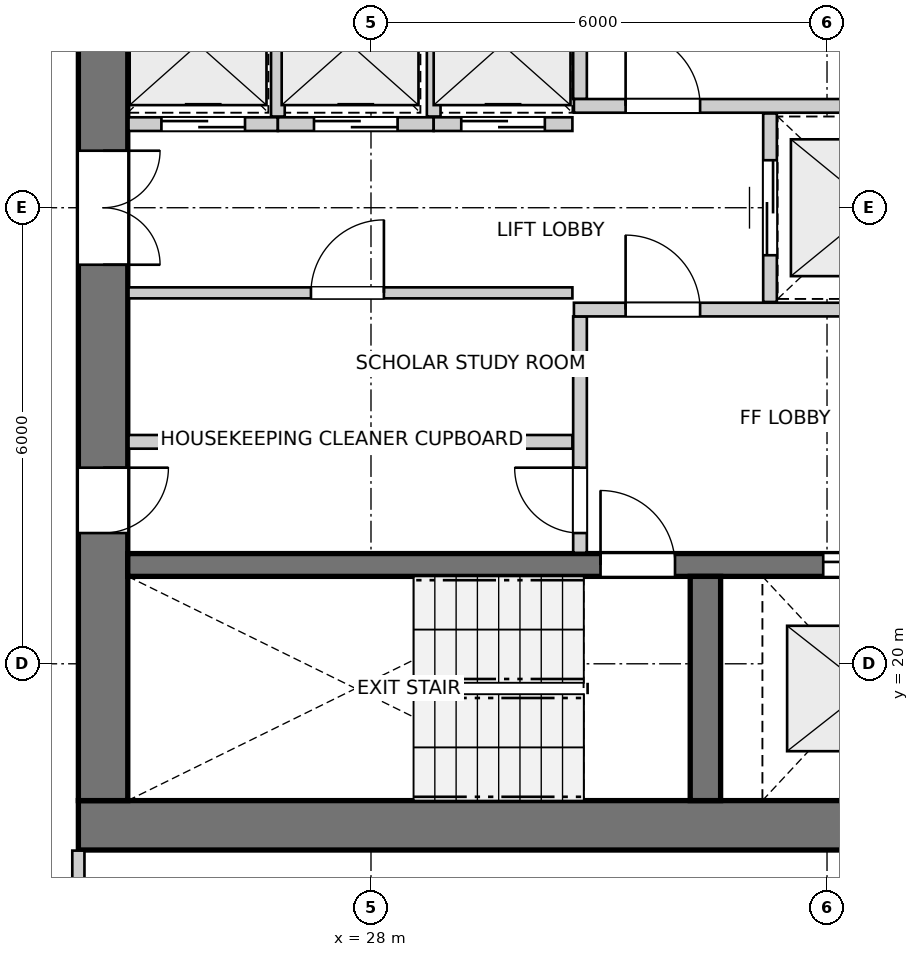
"""IFC4 building model, lengths in metres.
Left out: names, types, materials, properties, quantities, classifications, styles, units other than length and angle.
Written with IfcOpenShell. Run it as: python <this file> out.ifc"""

import sys

from ifc_helpers import new_model, si_unit, direction, frame, frame_2d, origin, place, context, subcontext, project, spatial, rectangle, extrude, source, transform, mapped, element, fill, save


model = new_model("IFC4")
c1 = context("Model", 3, precision=1e-05, world=origin(), true_north=direction((0.0, 1.0)))
c2 = subcontext(c1, "Body", "Model", "MODEL_VIEW")
j1 = project(units=[si_unit("LENGTHUNIT", "METRE"), si_unit("PLANEANGLEUNIT", "RADIAN")], contexts=[c1])
p1 = place(None, origin())
s1 = spatial("IfcSite", under=j1, at=p1, CompositionType="ELEMENT")
p2 = place(p1, origin())
s2 = spatial("IfcBuilding", under=s1, at=p2, CompositionType="ELEMENT")
p3 = place(p2, frame((0.0, 0.0, 139.4)))
s3 = spatial("IfcBuildingStorey", under=s2, at=p3, CompositionType="ELEMENT", Elevation=139.4)
p4 = place(p3, frame((24.15, 17.875, 0.0), z_axis=(0.0, 0.0, 1.0), x_axis=(1.0, 0.0, 0.0)))
e1 = element("IfcWall", 1, at=p4, inside=s3, PredefinedType="SHEAR", context=c2, shape_type="SweptSolid", body=[
    extrude(rectangle(XDim=12.4, YDim=0.65, at=frame_2d((6.2, 0.0))), origin(), (0.0, 0.0, 1.0), 2.95),
])
p5 = place(p3, frame((24.475, 33.8, 0.0), z_axis=(0.0, 0.0, 1.0), x_axis=(0.0, -1.0, 0.0)))
e2 = element("IfcWall", 2, at=p5, inside=s3, PredefinedType="SHEAR", context=c2, shape_type="SweptSolid", body=[
    extrude(rectangle(XDim=15.6, YDim=0.65, at=frame_2d((7.8, 0.0))), origin(), (0.0, 0.0, 1.0), 2.95),
])
p6 = place(p5, frame((7.05, 0.0, 0.0)))
e3 = element("IfcOpeningElement", 3, at=p6, cuts=e2, PredefinedType="OPENING", context=c2, shape_type="SweptSolid", body=[
    extrude(rectangle(XDim=1.5, YDim=2.15, at=frame_2d((0.75, 1.075))), frame((0.0, 0.335, 0.0), z_axis=(0.0, -1.0, 0.0), x_axis=(1.0, 0.0, 0.0)), (0.0, 0.0, 1.0), 0.67),
])
p7 = place(p5, frame((3.52, 0.0, 0.0)))
e4 = element("IfcOpeningElement", 4, at=p7, cuts=e2, PredefinedType="OPENING", context=c2, shape_type="SweptSolid", body=[
    extrude(rectangle(XDim=0.86, YDim=2.05, at=frame_2d((0.43, 1.025))), frame((0.0, 0.335, 0.0), z_axis=(0.0, -1.0, 0.0), x_axis=(1.0, 0.0, 0.0)), (0.0, 0.0, 1.0), 0.67),
])
p8 = place(p5, frame((11.22, 0.0, 0.0)))
e5 = element("IfcOpeningElement", 5, at=p8, cuts=e2, PredefinedType="OPENING", context=c2, shape_type="SweptSolid", body=[
    extrude(rectangle(XDim=0.86, YDim=2.05, at=frame_2d((0.43, 1.025))), frame((0.0, 0.335, 0.0), z_axis=(0.0, -1.0, 0.0), x_axis=(1.0, 0.0, 0.0)), (0.0, 0.0, 1.0), 0.67),
])
p9 = place(p3, frame((24.8, 21.3, 0.0), z_axis=(0.0, 0.0, 1.0), x_axis=(1.0, 0.0, 0.0)))
e6 = element("IfcWall", 6, at=p9, inside=s3, PredefinedType="SHEAR", context=c2, shape_type="SweptSolid", body=[
    extrude(rectangle(XDim=11.1, YDim=0.3, at=frame_2d((5.55, 0.0))), origin(), (0.0, 0.0, 1.0), 2.95),
])
p10 = place(p9, frame((6.22, 0.0, 0.0)))
e7 = element("IfcOpeningElement", 7, at=p10, cuts=e6, PredefinedType="OPENING", context=c2, shape_type="SweptSolid", body=[
    extrude(rectangle(XDim=0.98, YDim=2.15, at=frame_2d((0.49, 1.075))), frame((0.0, 0.16, 0.0), z_axis=(0.0, -1.0, 0.0), x_axis=(1.0, 0.0, 0.0)), (0.0, 0.0, 1.0), 0.32),
])
p11 = place(p9, frame((9.15, 0.0, 0.0)))
e8 = element("IfcOpeningElement", 8, at=p11, cuts=e6, PredefinedType="OPENING", context=c2, shape_type="SweptSolid", body=[
    extrude(rectangle(XDim=1.15, YDim=2.15, at=frame_2d((0.575, 1.075))), frame((0.0, 0.16, 0.0), z_axis=(0.0, -1.0, 0.0), x_axis=(1.0, 0.0, 0.0)), (0.0, 0.0, 1.0), 0.32),
])
p12 = place(p3, frame((32.4, 18.2, 0.0), z_axis=(0.0, 0.0, 1.0), x_axis=(0.0, 1.0, 0.0)))
e9 = element("IfcWall", 9, at=p12, inside=s3, PredefinedType="SHEAR", context=c2, shape_type="SweptSolid", body=[
    extrude(rectangle(XDim=2.95, YDim=0.4, at=frame_2d((1.475, 0.0))), origin(), (0.0, 0.0, 1.0), 2.95),
])
p13 = place(p3, frame((30.75, 21.46, 0.0), z_axis=(0.0, 0.0, 1.0), x_axis=(0.0, 1.0, 0.0)))
e10 = element("IfcWall", 10, at=p13, inside=s3, PredefinedType="PARTITIONING", context=c2, shape_type="SweptSolid", body=[
    extrude(rectangle(XDim=3.11, YDim=0.18, at=frame_2d((1.555, 0.0))), origin(), (0.0, 0.0, 1.0), 2.95),
])
p14 = place(p13, frame((0.26, 0.0, 0.0)))
e11 = element("IfcOpeningElement", 11, at=p14, cuts=e10, PredefinedType="OPENING", context=c2, shape_type="SweptSolid", body=[
    extrude(rectangle(XDim=0.86, YDim=2.05, at=frame_2d((0.43, 1.025))), frame((0.0, 0.1, 0.0), z_axis=(0.0, -1.0, 0.0), x_axis=(1.0, 0.0, 0.0)), (0.0, 0.0, 1.0), 0.2),
])
p15 = place(p3, frame((30.67, 24.66, 0.0), z_axis=(0.0, 0.0, 1.0), x_axis=(1.0, 0.0, 0.0)))
e12 = element("IfcWall", 12, at=p15, inside=s3, PredefinedType="PARTITIONING", context=c2, shape_type="SweptSolid", body=[
    extrude(rectangle(XDim=5.22, YDim=0.18, at=frame_2d((2.61, 0.0))), origin(), (0.0, 0.0, 1.0), 2.95),
])
p16 = place(p15, frame((0.68, 0.0, 0.0)))
e13 = element("IfcOpeningElement", 13, at=p16, cuts=e12, PredefinedType="OPENING", context=c2, shape_type="SweptSolid", body=[
    extrude(rectangle(XDim=0.98, YDim=2.15, at=frame_2d((0.49, 1.075))), frame((0.0, 0.1, 0.0), z_axis=(0.0, -1.0, 0.0), x_axis=(1.0, 0.0, 0.0)), (0.0, 0.0, 1.0), 0.2),
])
p17 = place(p3, frame((30.75, 27.43, 0.0), z_axis=(0.0, 0.0, 1.0), x_axis=(0.0, 1.0, 0.0)))
e14 = element("IfcWall", 14, at=p17, inside=s3, PredefinedType="PARTITIONING", context=c2, shape_type="SweptSolid", body=[
    extrude(rectangle(XDim=3.11, YDim=0.18, at=frame_2d((1.555, 0.0))), origin(), (0.0, 0.0, 1.0), 2.95),
])
p18 = place(p17, frame((1.98, 0.0, 0.0)))
e15 = element("IfcOpeningElement", 15, at=p18, cuts=e14, PredefinedType="OPENING", context=c2, shape_type="SweptSolid", body=[
    extrude(rectangle(XDim=0.86, YDim=2.05, at=frame_2d((0.43, 1.025))), frame((0.0, 0.1, 0.0), z_axis=(0.0, -1.0, 0.0), x_axis=(1.0, 0.0, 0.0)), (0.0, 0.0, 1.0), 0.2),
])
p19 = place(p3, frame((30.67, 27.34, 0.0), z_axis=(0.0, 0.0, 1.0), x_axis=(1.0, 0.0, 0.0)))
e16 = element("IfcWall", 16, at=p19, inside=s3, PredefinedType="PARTITIONING", context=c2, shape_type="SweptSolid", body=[
    extrude(rectangle(XDim=5.22, YDim=0.18, at=frame_2d((2.61, 0.0))), origin(), (0.0, 0.0, 1.0), 2.95),
])
p20 = place(p19, frame((0.68, 0.0, 0.0)))
e17 = element("IfcOpeningElement", 17, at=p20, cuts=e16, PredefinedType="OPENING", context=c2, shape_type="SweptSolid", body=[
    extrude(rectangle(XDim=0.98, YDim=2.15, at=frame_2d((0.49, 1.075))), frame((0.0, 0.1, 0.0), z_axis=(0.0, -1.0, 0.0), x_axis=(1.0, 0.0, 0.0)), (0.0, 0.0, 1.0), 0.2),
])
p21 = place(p3, frame((33.25, 24.76, 0.0), z_axis=(0.0, 0.0, 1.0), x_axis=(0.0, 1.0, 0.0)))
e18 = element("IfcWall", 18, at=p21, inside=s3, PredefinedType="PARTITIONING", context=c2, shape_type="SweptSolid", body=[
    extrude(rectangle(XDim=2.48, YDim=0.18, at=frame_2d((1.24, 0.0))), origin(), (0.0, 0.0, 1.0), 2.95),
])
p22 = place(p21, frame((0.615, 0.0, 0.0)))
e19 = element("IfcOpeningElement", 19, at=p22, cuts=e18, PredefinedType="OPENING", context=c2, shape_type="SweptSolid", body=[
    extrude(rectangle(XDim=1.25, YDim=2.15, at=frame_2d((0.625, 1.075))), frame((0.0, 0.1, 0.0), z_axis=(0.0, -1.0, 0.0), x_axis=(1.0, 0.0, 0.0)), (0.0, 0.0, 1.0), 0.2),
])
p23 = place(p3, frame((24.81, 22.92, 0.0), z_axis=(0.0, 0.0, 1.0), x_axis=(1.0, 0.0, 0.0)))
e20 = element("IfcWall", 20, at=p23, inside=s3, PredefinedType="PARTITIONING", context=c2, shape_type="SweptSolid", body=[
    extrude(rectangle(XDim=5.84, YDim=0.18, at=frame_2d((2.92, 0.0))), origin(), (0.0, 0.0, 1.0), 2.95),
])
p24 = place(p3, frame((24.81, 24.88, 0.0), z_axis=(0.0, 0.0, 1.0), x_axis=(1.0, 0.0, 0.0)))
e21 = element("IfcWall", 21, at=p24, inside=s3, PredefinedType="PARTITIONING", context=c2, shape_type="SweptSolid", body=[
    extrude(rectangle(XDim=5.84, YDim=0.145, at=frame_2d((2.92, 0.0))), origin(), (0.0, 0.0, 1.0), 2.95),
])
p25 = place(p24, frame((2.4, 0.0, 0.0)))
e22 = element("IfcOpeningElement", 22, at=p25, cuts=e21, PredefinedType="OPENING", context=c2, shape_type="SweptSolid", body=[
    extrude(rectangle(XDim=0.96, YDim=2.1, at=frame_2d((0.48, 1.05))), frame((0.0, 0.083, 0.0), z_axis=(0.0, -1.0, 0.0), x_axis=(1.0, 0.0, 0.0)), (0.0, 0.0, 1.0), 0.165),
])
p26 = place(p3, frame((24.81, 27.1, 0.0), z_axis=(0.0, 0.0, 1.0), x_axis=(1.0, 0.0, 0.0)))
e23 = element("IfcWall", 23, at=p26, inside=s3, PredefinedType="PARTITIONING", context=c2, shape_type="SweptSolid", body=[
    extrude(rectangle(XDim=1.965, YDim=0.18, at=frame_2d((0.982, 0.0))), origin(), (0.0, 0.0, 1.0), 2.95),
])
p27 = place(p26, frame((0.433, 0.0, 0.0)))
e24 = element("IfcOpeningElement", 24, at=p27, cuts=e23, PredefinedType="OPENING", context=c2, shape_type="SweptSolid", body=[
    extrude(rectangle(XDim=1.1, YDim=2.15, at=frame_2d((0.55, 1.075))), frame((0.0, 0.1, 0.0), z_axis=(0.0, -1.0, 0.0), x_axis=(1.0, 0.0, 0.0)), (0.0, 0.0, 1.0), 0.2),
])
p28 = place(p3, frame((26.775, 27.1, 0.0), z_axis=(0.0, 0.0, 1.0), x_axis=(1.0, 0.0, 0.0)))
e25 = element("IfcWall", 25, at=p28, inside=s3, PredefinedType="PARTITIONING", context=c2, shape_type="SweptSolid", body=[
    extrude(rectangle(XDim=2.05, YDim=0.18, at=frame_2d((1.025, 0.0))), origin(), (0.0, 0.0, 1.0), 2.95),
])
p29 = place(p28, frame((0.475, 0.0, 0.0)))
e26 = element("IfcOpeningElement", 26, at=p29, cuts=e25, PredefinedType="OPENING", context=c2, shape_type="SweptSolid", body=[
    extrude(rectangle(XDim=1.1, YDim=2.15, at=frame_2d((0.55, 1.075))), frame((0.0, 0.1, 0.0), z_axis=(0.0, -1.0, 0.0), x_axis=(1.0, 0.0, 0.0)), (0.0, 0.0, 1.0), 0.2),
])
p30 = place(p3, frame((26.775, 27.2, 0.0), z_axis=(0.0, 0.0, 1.0), x_axis=(0.0, 1.0, 0.0)))
e27 = element("IfcWall", 27, at=p30, inside=s3, PredefinedType="PARTITIONING", context=c2, shape_type="SweptSolid", body=[
    extrude(rectangle(XDim=1.78, YDim=0.18, at=frame_2d((0.89, 0.0))), origin(), (0.0, 0.0, 1.0), 2.95),
])
p31 = place(p3, frame((28.825, 27.1, 0.0), z_axis=(0.0, 0.0, 1.0), x_axis=(1.0, 0.0, 0.0)))
e28 = element("IfcWall", 28, at=p31, inside=s3, PredefinedType="PARTITIONING", context=c2, shape_type="SweptSolid", body=[
    extrude(rectangle(XDim=1.825, YDim=0.18, at=frame_2d((0.913, 0.0))), origin(), (0.0, 0.0, 1.0), 2.95),
])
p32 = place(p31, frame((0.363, 0.0, 0.0)))
e29 = element("IfcOpeningElement", 29, at=p32, cuts=e28, PredefinedType="OPENING", context=c2, shape_type="SweptSolid", body=[
    extrude(rectangle(XDim=1.1, YDim=2.15, at=frame_2d((0.55, 1.075))), frame((0.0, 0.1, 0.0), z_axis=(0.0, -1.0, 0.0), x_axis=(1.0, 0.0, 0.0)), (0.0, 0.0, 1.0), 0.2),
])
p33 = place(p3, frame((28.825, 27.2, 0.0), z_axis=(0.0, 0.0, 1.0), x_axis=(0.0, 1.0, 0.0)))
e30 = element("IfcWall", 30, at=p33, inside=s3, PredefinedType="PARTITIONING", context=c2, shape_type="SweptSolid", body=[
    extrude(rectangle(XDim=1.78, YDim=0.18, at=frame_2d((0.89, 0.0))), origin(), (0.0, 0.0, 1.0), 2.95),
])
p34 = place(p3, frame((24.15, 13.516, 0.0), z_axis=(0.0, 0.0, 1.0), x_axis=(0.0, 1.0, 0.0)))
e31 = element("IfcWall", 31, at=p34, inside=s3, PredefinedType="PARTITIONING", context=c2, shape_type="SweptSolid", body=[
    extrude(rectangle(XDim=4.026, YDim=0.16, at=frame_2d((2.013, 0.0))), origin(), (0.0, 0.0, 1.0), 2.95),
])
m1 = source(origin(), c2, "Body", "SweptSolid", [
    extrude(rectangle(XDim=0.98, YDim=2.15, at=frame_2d((0.49, 1.075))), frame((0.0, 0.025, 0.0), z_axis=(0.0, -1.0, 0.0), x_axis=(1.0, 0.0, 0.0)), (0.0, 0.0, 1.0), 0.05),
])
p35 = place(p10, origin())
e32 = element("IfcDoor", 32, at=p35, inside=s3, OperationType="SINGLE_SWING_LEFT", PredefinedType="DOOR", context=c2, shape_type="MappedRepresentation", body=[
    mapped(m1, transform((0.0, 0.0, 0.0), x_axis=(1.0, 0.0, 0.0), y_axis=(0.0, 1.0, 0.0), z_axis=(0.0, 0.0, 1.0), scale=1.0)),
])
fill(e7, e32)
m2 = source(origin(), c2, "Body", "SweptSolid", [
    extrude(rectangle(XDim=1.15, YDim=2.15, at=frame_2d((0.575, 1.075))), frame((0.0, 0.025, 0.0), z_axis=(0.0, -1.0, 0.0), x_axis=(1.0, 0.0, 0.0)), (0.0, 0.0, 1.0), 0.05),
])
p36 = place(p11, origin())
e33 = element("IfcDoor", 33, at=p36, inside=s3, OperationType="DOUBLE_DOOR_SLIDING", PredefinedType="DOOR", context=c2, shape_type="MappedRepresentation", body=[
    mapped(m2, transform((0.0, 0.0, 0.0), x_axis=(1.0, 0.0, 0.0), y_axis=(0.0, 1.0, 0.0), z_axis=(0.0, 0.0, 1.0), scale=1.0)),
])
fill(e8, e33)
m3 = source(origin(), c2, "Body", "SweptSolid", [
    extrude(rectangle(XDim=1.5, YDim=2.15, at=frame_2d((0.75, 1.075))), frame((0.0, 0.025, 0.0), z_axis=(0.0, -1.0, 0.0), x_axis=(1.0, 0.0, 0.0)), (0.0, 0.0, 1.0), 0.05),
])
p37 = place(p6, origin())
e34 = element("IfcDoor", 34, at=p37, inside=s3, OperationType="DOUBLE_DOOR_SINGLE_SWING", PredefinedType="DOOR", context=c2, shape_type="MappedRepresentation", body=[
    mapped(m3, transform((0.0, 0.0, 0.0), x_axis=(1.0, 0.0, 0.0), y_axis=(0.0, 1.0, 0.0), z_axis=(0.0, 0.0, 1.0), scale=1.0)),
])
fill(e3, e34)
m4 = source(origin(), c2, "Body", "SweptSolid", [
    extrude(rectangle(XDim=0.86, YDim=2.05, at=frame_2d((0.43, 1.025))), frame((0.0, 0.025, 0.0), z_axis=(0.0, -1.0, 0.0), x_axis=(1.0, 0.0, 0.0)), (0.0, 0.0, 1.0), 0.05),
])
p38 = place(p8, origin())
e35 = element("IfcDoor", 35, at=p38, inside=s3, OperationType="SINGLE_SWING_LEFT", PredefinedType="DOOR", context=c2, shape_type="MappedRepresentation", body=[
    mapped(m4, transform((0.0, 0.0, 0.0), x_axis=(1.0, 0.0, 0.0), y_axis=(0.0, 1.0, 0.0), z_axis=(0.0, 0.0, 1.0), scale=1.0)),
])
fill(e5, e35)
p39 = place(p14, origin())
e36 = element("IfcDoor", 36, at=p39, inside=s3, OperationType="SINGLE_SWING_RIGHT", PredefinedType="DOOR", context=c2, shape_type="MappedRepresentation", body=[
    mapped(m4, transform((0.0, 0.0, 0.0), x_axis=(1.0, 0.0, 0.0), y_axis=(0.0, 1.0, 0.0), z_axis=(0.0, 0.0, 1.0), scale=1.0)),
])
fill(e11, e36)
p40 = place(p16, origin())
e37 = element("IfcDoor", 37, at=p40, inside=s3, OperationType="SINGLE_SWING_LEFT", PredefinedType="DOOR", context=c2, shape_type="MappedRepresentation", body=[
    mapped(m1, transform((0.0, 0.0, 0.0), x_axis=(1.0, 0.0, 0.0), y_axis=(0.0, 1.0, 0.0), z_axis=(0.0, 0.0, 1.0), scale=1.0)),
])
fill(e13, e37)
p41 = place(p20, origin())
e38 = element("IfcDoor", 38, at=p41, inside=s3, OperationType="SINGLE_SWING_LEFT", PredefinedType="DOOR", context=c2, shape_type="MappedRepresentation", body=[
    mapped(m1, transform((0.0, 0.0, 0.0), x_axis=(1.0, 0.0, 0.0), y_axis=(0.0, 1.0, 0.0), z_axis=(0.0, 0.0, 1.0), scale=1.0)),
])
fill(e17, e38)
m5 = source(origin(), c2, "Body", "SweptSolid", [
    extrude(rectangle(XDim=1.25, YDim=2.15, at=frame_2d((0.625, 1.075))), frame((0.0, 0.025, 0.0), z_axis=(0.0, -1.0, 0.0), x_axis=(1.0, 0.0, 0.0)), (0.0, 0.0, 1.0), 0.05),
])
p42 = place(p22, origin())
e39 = element("IfcDoor", 39, at=p42, inside=s3, OperationType="DOUBLE_DOOR_SLIDING", PredefinedType="DOOR", context=c2, shape_type="MappedRepresentation", body=[
    mapped(m5, transform((0.0, 0.0, 0.0), x_axis=(1.0, 0.0, 0.0), y_axis=(0.0, 1.0, 0.0), z_axis=(0.0, 0.0, 1.0), scale=1.0)),
])
fill(e19, e39)
m6 = source(origin(), c2, "Body", "SweptSolid", [
    extrude(rectangle(XDim=0.96, YDim=2.1, at=frame_2d((0.48, 1.05))), frame((0.0, 0.025, 0.0), z_axis=(0.0, -1.0, 0.0), x_axis=(1.0, 0.0, 0.0)), (0.0, 0.0, 1.0), 0.05),
])
p43 = place(p25, origin())
e40 = element("IfcDoor", 40, at=p43, inside=s3, OperationType="SINGLE_SWING_RIGHT", PredefinedType="DOOR", context=c2, shape_type="MappedRepresentation", body=[
    mapped(m6, transform((0.0, 0.0, 0.0), x_axis=(1.0, 0.0, 0.0), y_axis=(0.0, 1.0, 0.0), z_axis=(0.0, 0.0, 1.0), scale=1.0)),
])
fill(e22, e40)
m7 = source(origin(), c2, "Body", "SweptSolid", [
    extrude(rectangle(XDim=1.1, YDim=2.15, at=frame_2d((0.55, 1.075))), frame((0.0, 0.025, 0.0), z_axis=(0.0, -1.0, 0.0), x_axis=(1.0, 0.0, 0.0)), (0.0, 0.0, 1.0), 0.05),
])
p44 = place(p27, origin())
e41 = element("IfcDoor", 41, at=p44, inside=s3, OperationType="DOUBLE_DOOR_SLIDING", PredefinedType="DOOR", context=c2, shape_type="MappedRepresentation", body=[
    mapped(m7, transform((0.0, 0.0, 0.0), x_axis=(1.0, 0.0, 0.0), y_axis=(0.0, 1.0, 0.0), z_axis=(0.0, 0.0, 1.0), scale=1.0)),
])
fill(e24, e41)
p45 = place(p29, origin())
e42 = element("IfcDoor", 42, at=p45, inside=s3, OperationType="DOUBLE_DOOR_SLIDING", PredefinedType="DOOR", context=c2, shape_type="MappedRepresentation", body=[
    mapped(m7, transform((0.0, 0.0, 0.0), x_axis=(1.0, 0.0, 0.0), y_axis=(0.0, 1.0, 0.0), z_axis=(0.0, 0.0, 1.0), scale=1.0)),
])
fill(e26, e42)
p46 = place(p32, origin())
e43 = element("IfcDoor", 43, at=p46, inside=s3, OperationType="DOUBLE_DOOR_SLIDING", PredefinedType="DOOR", context=c2, shape_type="MappedRepresentation", body=[
    mapped(m7, transform((0.0, 0.0, 0.0), x_axis=(1.0, 0.0, 0.0), y_axis=(0.0, 1.0, 0.0), z_axis=(0.0, 0.0, 1.0), scale=1.0)),
])
fill(e29, e43)
save(model, sys.argv[1])
